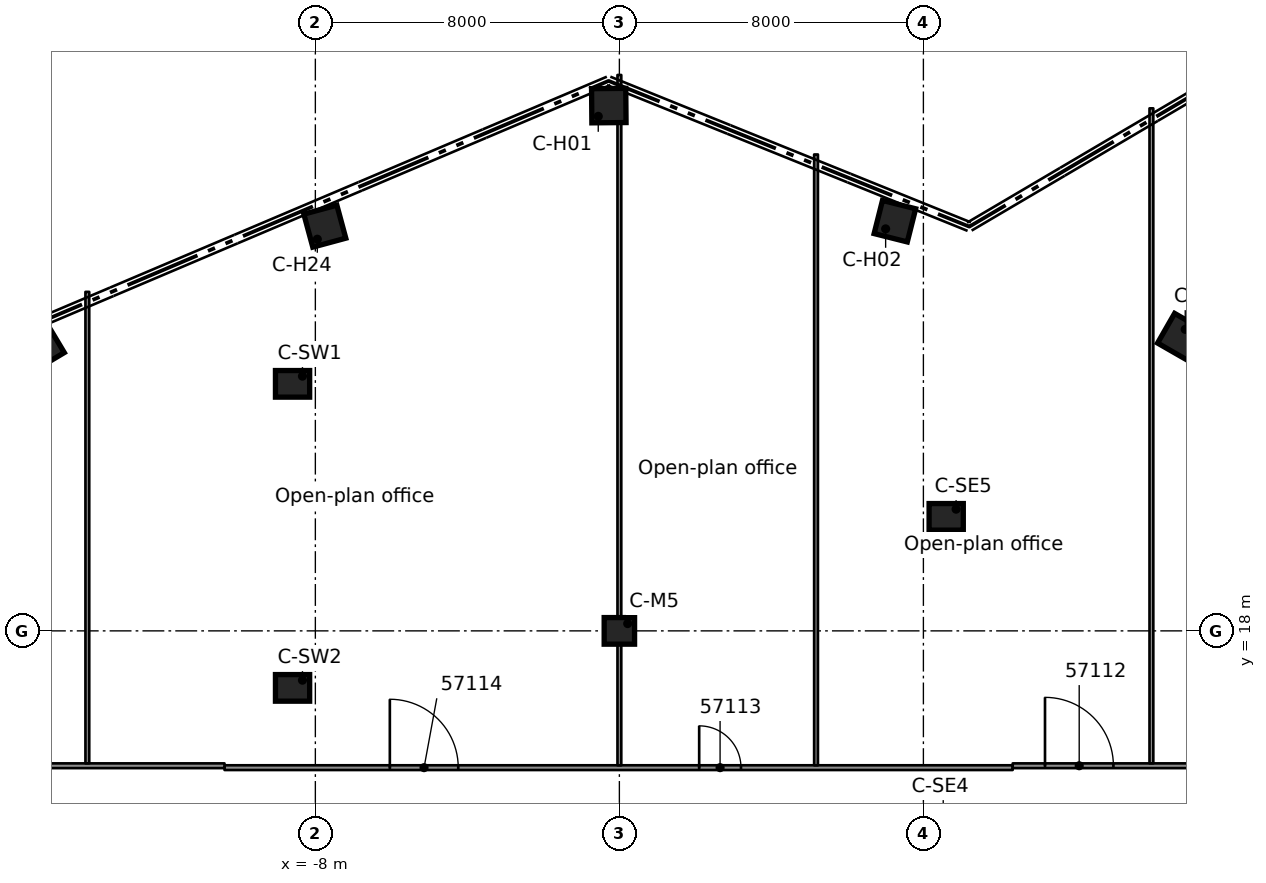
"""IFC4 building model, lengths in metres.
Left out: names, types, materials, properties, quantities, classifications, styles, units other than length and angle.
Written with IfcOpenShell. Run it as: python <this file> out.ifc"""

import sys

from ifc_helpers import new_model, si_unit, direction, frame, frame_2d, origin, origin_2d, place, context, subcontext, project, spatial, rectangle, extrude, element, fill, save


model = new_model("IFC4")
c1 = context("Model", 3, precision=1e-05, world=origin(), true_north=direction((0.0, 1.0)))
c2 = subcontext(c1, "Body", "Model", "MODEL_VIEW")
j1 = project(units=[si_unit("LENGTHUNIT", "METRE"), si_unit("PLANEANGLEUNIT", "RADIAN")], contexts=[c1])
p1 = place(None, origin())
s1 = spatial("IfcSite", under=j1, at=p1, CompositionType="ELEMENT")
p2 = place(p1, origin())
s2 = spatial("IfcBuilding", under=s1, at=p2, CompositionType="ELEMENT")
p3 = place(p2, frame((0.0, 0.0, 282.4)))
s3 = spatial("IfcBuildingStorey", under=s2, at=p3, CompositionType="ELEMENT", Elevation=282.4)
for number, where, z_axis, x_axis in (
    (1, (-0.278, 31.821, 0.0), (0.0, 0.0, 1.0), (-0.009, 1.0, 0.0)),
    (2, (7.25, 28.78, 0.0), (0.0, 0.0, 1.0), (0.244, 0.97, 0.0)),
    (3, (14.777, 25.739, 0.0), (0.0, 0.0, 1.0), (0.498, 0.867, 0.0)),
    (4, (-15.224, 25.477, 0.0), (0.0, 0.0, 1.0), (-0.513, 0.858, 0.0)),
    (5, (-7.751, 28.649, 0.0), (0.0, 0.0, 1.0), (-0.261, 0.965, 0.0)),
):
    element("IfcColumn", number, at=place(p3, frame(where, z_axis=z_axis, x_axis=x_axis)), inside=s3, PredefinedType="COLUMN", context=c2, shape_type="SweptSolid", body=[
        extrude(rectangle(XDim=0.9, YDim=0.9, at=origin_2d()), origin(), (0.0, 0.0, 1.0), 3.5),
    ])
p4 = place(p3, frame((0.0, 18.0, 0.0), z_axis=(0.0, 0.0, 1.0), x_axis=(1.0, 0.0, 0.0)))
e6 = element("IfcColumn", 6, at=p4, inside=s3, PredefinedType="COLUMN", context=c2, shape_type="SweptSolid", body=[
    extrude(rectangle(XDim=0.8, YDim=0.7, at=origin_2d()), origin(), (0.0, 0.0, 1.0), 3.5),
])
for number, where, z_axis, x_axis in (
    (7, (8.6, 21.0, 0.0), (0.0, 0.0, 1.0), (1.0, 0.0, 0.0)),
    (8, (-8.6, 24.5, 0.0), (0.0, 0.0, 1.0), (1.0, 0.0, 0.0)),
    (9, (-8.6, 16.5, 0.0), (0.0, 0.0, 1.0), (1.0, 0.0, 0.0)),
):
    element("IfcColumn", number, at=place(p3, frame(where, z_axis=z_axis, x_axis=x_axis)), inside=s3, PredefinedType="COLUMN", context=c2, shape_type="SweptSolid", body=[
        extrude(rectangle(XDim=0.9, YDim=0.7, at=origin_2d()), origin(), (0.0, 0.0, 1.0), 3.5),
    ])
p5 = place(p3, frame((-10.39, 14.401, 0.0), z_axis=(0.0, 0.0, 1.0), x_axis=(1.0, 0.0, 0.0)))
e10 = element("IfcWall", 10, at=p5, inside=s3, PredefinedType="PARTITIONING", context=c2, shape_type="SweptSolid", body=[
    extrude(rectangle(XDim=20.739, YDim=0.125, at=frame_2d((10.37, 0.0))), origin(), (0.0, 0.0, 1.0), 3.08),
])
p6 = place(p5, frame((12.49, 0.0, 0.0)))
e11 = element("IfcOpeningElement", 11, at=p6, cuts=e10, PredefinedType="OPENING", context=c2, shape_type="SweptSolid", body=[
    extrude(rectangle(XDim=1.1, YDim=2.1, at=frame_2d((0.55, 1.05))), frame((0.0, 0.073, 0.0), z_axis=(0.0, -1.0, 0.0), x_axis=(1.0, 0.0, 0.0)), (0.0, 0.0, 1.0), 0.145),
])
p7 = place(p5, frame((4.35, 0.0, 0.0)))
e12 = element("IfcOpeningElement", 12, at=p7, cuts=e10, PredefinedType="OPENING", context=c2, shape_type="SweptSolid", body=[
    extrude(rectangle(XDim=1.8, YDim=2.1, at=frame_2d((0.9, 1.05))), frame((0.0, 0.073, 0.0), z_axis=(0.0, -1.0, 0.0), x_axis=(1.0, 0.0, 0.0)), (0.0, 0.0, 1.0), 0.145),
])
p8 = place(p3, frame((-21.387, 14.451, 0.0), z_axis=(0.0, 0.0, 1.0), x_axis=(1.0, 0.0, 0.0)))
e13 = element("IfcWall", 13, at=p8, inside=s3, PredefinedType="PARTITIONING", context=c2, shape_type="SweptSolid", body=[
    extrude(rectangle(XDim=10.996, YDim=0.125, at=frame_2d((5.498, 0.0))), origin(), (0.0, 0.0, 1.0), 3.08),
])
p9 = place(p8, frame((3.038, 0.0, 0.0)))
e14 = element("IfcOpeningElement", 14, at=p9, cuts=e13, PredefinedType="OPENING", context=c2, shape_type="SweptSolid", body=[
    extrude(rectangle(XDim=1.1, YDim=2.1, at=frame_2d((0.55, 1.05))), frame((0.0, 0.073, 0.0), z_axis=(0.0, -1.0, 0.0), x_axis=(1.0, 0.0, 0.0)), (0.0, 0.0, 1.0), 0.145),
])
p10 = place(p3, frame((10.35, 14.451, 0.0), z_axis=(0.0, 0.0, 1.0), x_axis=(1.0, 0.0, 0.0)))
e15 = element("IfcWall", 15, at=p10, inside=s3, PredefinedType="PARTITIONING", context=c2, shape_type="SweptSolid", body=[
    extrude(rectangle(XDim=11.037, YDim=0.125, at=frame_2d((5.519, 0.0))), origin(), (0.0, 0.0, 1.0), 3.08),
])
p11 = place(p10, frame((6.5, 0.0, 0.0)))
e16 = element("IfcOpeningElement", 16, at=p11, cuts=e15, PredefinedType="OPENING", context=c2, shape_type="SweptSolid", body=[
    extrude(rectangle(XDim=1.8, YDim=2.1, at=frame_2d((0.9, 1.05))), frame((0.0, 0.073, 0.0), z_axis=(0.0, -1.0, 0.0), x_axis=(1.0, 0.0, 0.0)), (0.0, 0.0, 1.0), 0.145),
])
p12 = place(p10, frame((0.85, 0.0, 0.0)))
e17 = element("IfcOpeningElement", 17, at=p12, cuts=e15, PredefinedType="OPENING", context=c2, shape_type="SweptSolid", body=[
    extrude(rectangle(XDim=1.8, YDim=2.1, at=frame_2d((0.9, 1.05))), frame((0.0, 0.073, 0.0), z_axis=(0.0, -1.0, 0.0), x_axis=(1.0, 0.0, 0.0)), (0.0, 0.0, 1.0), 0.145),
])
p13 = place(p3, frame((14.0, 14.514, 0.0), z_axis=(0.0, 0.0, 1.0), x_axis=(0.0, 1.0, 0.0)))
e18 = element("IfcWall", 18, at=p13, inside=s3, PredefinedType="PARTITIONING", context=c2, shape_type="SweptSolid", body=[
    extrude(rectangle(XDim=17.235, YDim=0.1, at=frame_2d((8.618, 0.0))), origin(), (0.0, 0.0, 1.0), 3.08),
])
p14 = place(p3, frame((5.175, 14.463, 0.0), z_axis=(0.0, 0.0, 1.0), x_axis=(0.0, 1.0, 0.0)))
e19 = element("IfcWall", 19, at=p14, inside=s3, PredefinedType="PARTITIONING", context=c2, shape_type="SweptSolid", body=[
    extrude(rectangle(XDim=16.072, YDim=0.1, at=frame_2d((8.036, 0.0))), origin(), (0.0, 0.0, 1.0), 3.08),
])
p15 = place(p3, frame((0.0, 14.463, 0.0), z_axis=(0.0, 0.0, 1.0), x_axis=(0.0, 1.0, 0.0)))
e20 = element("IfcWall", 20, at=p15, inside=s3, PredefinedType="PARTITIONING", context=c2, shape_type="SweptSolid", body=[
    extrude(rectangle(XDim=18.164, YDim=0.1, at=frame_2d((9.082, 0.0))), origin(), (0.0, 0.0, 1.0), 3.08),
])
p16 = place(p3, frame((-14.0, 14.514, 0.0), z_axis=(0.0, 0.0, 1.0), x_axis=(0.0, 1.0, 0.0)))
e21 = element("IfcWall", 21, at=p16, inside=s3, PredefinedType="PARTITIONING", context=c2, shape_type="SweptSolid", body=[
    extrude(rectangle(XDim=12.406, YDim=0.1, at=frame_2d((6.203, 0.0))), origin(), (0.0, 0.0, 1.0), 3.08),
])
p17 = place(p12, origin())
e22 = element("IfcDoor", 22, at=p17, inside=s3, OperationType="DOUBLE_DOOR_SINGLE_SWING", PredefinedType="DOOR", context=c2, shape_type="SweptSolid", body=[
    extrude(rectangle(XDim=1.8, YDim=2.1, at=frame_2d((0.9, 1.05))), frame((0.0, 0.025, 0.0), z_axis=(0.0, -1.0, 0.0), x_axis=(1.0, 0.0, 0.0)), (0.0, 0.0, 1.0), 0.05),
])
fill(e17, e22)
p18 = place(p6, origin())
e23 = element("IfcDoor", 23, at=p18, inside=s3, OperationType="SINGLE_SWING_RIGHT", PredefinedType="DOOR", context=c2, shape_type="SweptSolid", body=[
    extrude(rectangle(XDim=1.1, YDim=2.1, at=frame_2d((0.55, 1.05))), frame((0.0, 0.025, 0.0), z_axis=(0.0, -1.0, 0.0), x_axis=(1.0, 0.0, 0.0)), (0.0, 0.0, 1.0), 0.05),
])
fill(e11, e23)
p19 = place(p7, origin())
e24 = element("IfcDoor", 24, at=p19, inside=s3, OperationType="DOUBLE_DOOR_SINGLE_SWING", PredefinedType="DOOR", context=c2, shape_type="SweptSolid", body=[
    extrude(rectangle(XDim=1.8, YDim=2.1, at=frame_2d((0.9, 1.05))), frame((0.0, 0.025, 0.0), z_axis=(0.0, -1.0, 0.0), x_axis=(1.0, 0.0, 0.0)), (0.0, 0.0, 1.0), 0.05),
])
fill(e12, e24)
save(model, sys.argv[1])
